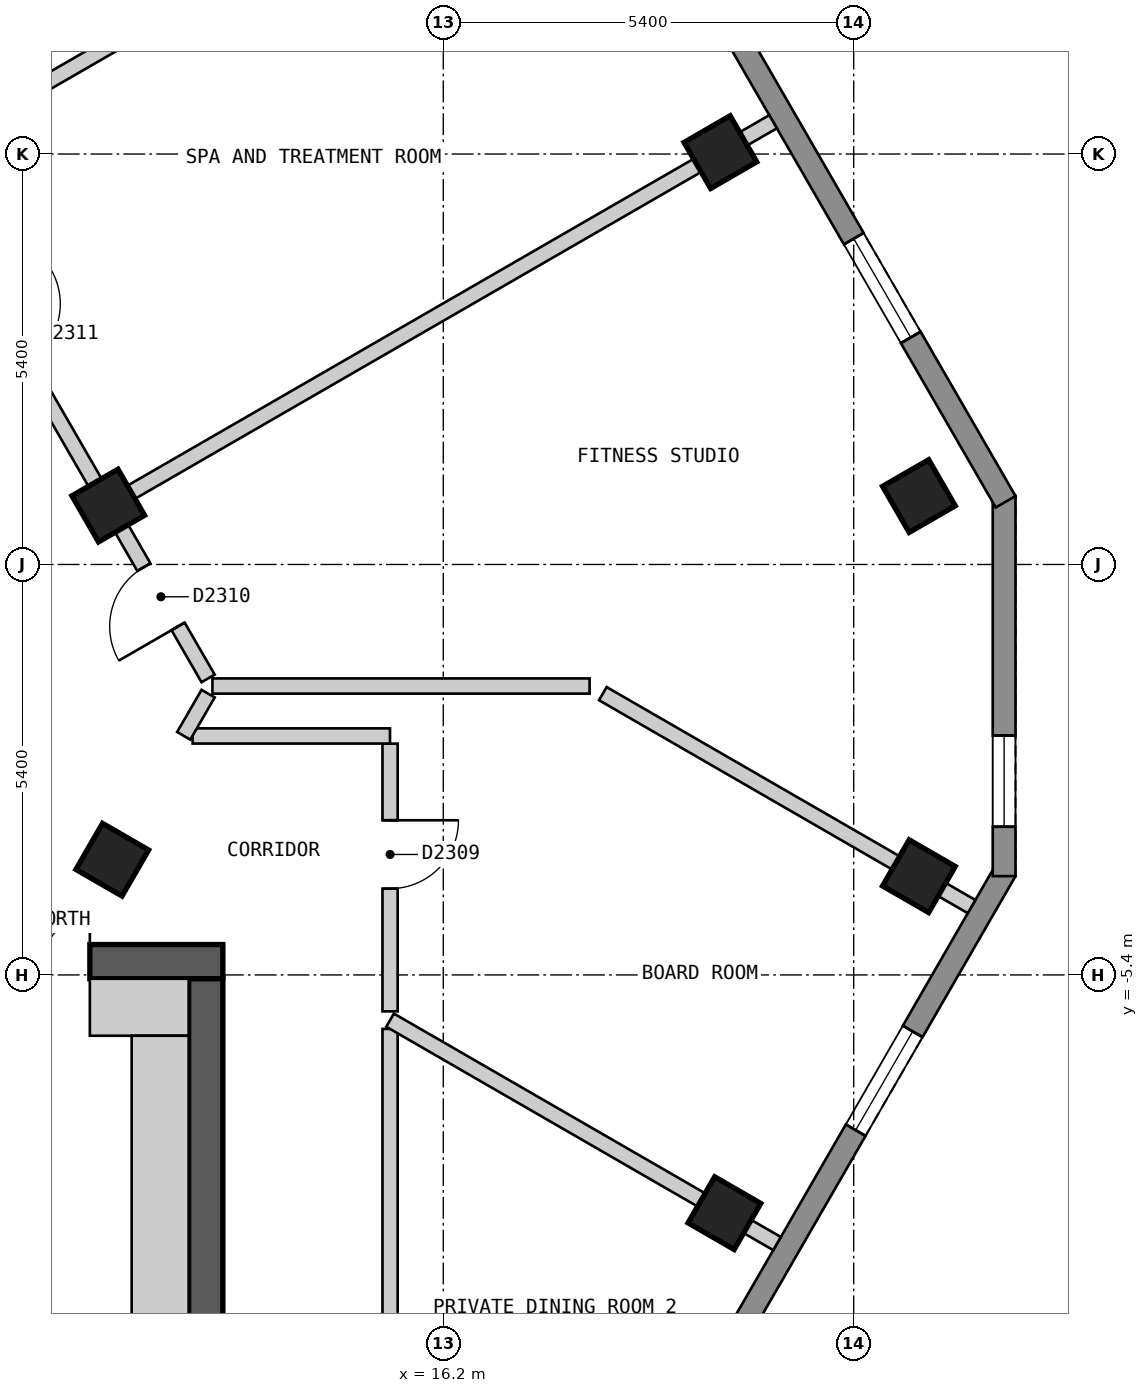
"""IFC4 building model, lengths in metres.
Left out: names, types, materials, properties, quantities, classifications, styles, units other than length and angle.
Written with IfcOpenShell. Run it as: python <this file> out.ifc"""

import sys

from ifc_helpers import new_model, si_unit, direction, frame, frame_2d, origin, origin_2d, place, context, subcontext, project, spatial, polyline, rectangle, outline, extrude, element, fill, save


model = new_model("IFC4")
c1 = context("Model", 3, precision=1e-05, world=origin(), true_north=direction((0.0, 1.0)))
c2 = subcontext(c1, "Body", "Model", "MODEL_VIEW")
j1 = project(units=[si_unit("LENGTHUNIT", "METRE"), si_unit("PLANEANGLEUNIT", "RADIAN")], contexts=[c1])
p1 = place(None, origin())
s1 = spatial("IfcSite", under=j1, at=p1, CompositionType="ELEMENT")
p2 = place(p1, origin())
s2 = spatial("IfcBuilding", under=s1, at=p2, CompositionType="ELEMENT")
p3 = place(p2, frame((0.0, 0.0, 241.8)))
s3 = spatial("IfcBuildingStorey", under=s2, at=p3, CompositionType="ELEMENT", Elevation=241.8)
for number, where, z_axis, x_axis in (
    (1, (19.899, -8.534, 0.0), (0.0, 0.0, 1.0), (0.5, 0.866, 0.0)),
    (2, (22.458, -4.101, 0.0), (0.0, 0.0, 1.0), (0.5, 0.866, 0.0)),
    (3, (22.458, 0.9, 0.0), (0.0, 0.0, 1.0), (-0.5, 0.866, 0.0)),
    (4, (19.846, 5.425, 0.0), (0.0, 0.0, 1.0), (-0.5, 0.866, 0.0)),
    (5, (11.845, -3.884, 0.0), (0.0, 0.0, 1.0), (0.5, 0.866, 0.0)),
    (6, (11.792, 0.775, 0.0), (0.0, 0.0, 1.0), (-0.5, 0.866, 0.0)),
):
    element("IfcColumn", number, at=place(p3, frame(where, z_axis=z_axis, x_axis=x_axis)), inside=s3, PredefinedType="COLUMN", context=c2, shape_type="SweptSolid", body=[
        extrude(rectangle(XDim=0.7, YDim=0.7, at=origin_2d()), origin(), (0.0, 0.0, 1.0), 3.0),
    ])
p4 = place(p3, frame((-13.3, -5.225, 0.0), z_axis=(0.0, 0.0, 1.0), x_axis=(1.0, 0.0, 0.0)))
e7 = element("IfcWall", 7, at=p4, inside=s3, PredefinedType="SHEAR", context=c2, shape_type="SweptSolid", body=[
    extrude(rectangle(XDim=26.6, YDim=0.45, at=frame_2d((13.3, 0.0))), origin(), (0.0, 0.0, 1.0), 2.2),
])
p5 = place(p4, frame((23.65, 0.0, 0.0)))
e8 = element("IfcOpeningElement", 8, at=p5, cuts=e7, PredefinedType="OPENING", context=c2, shape_type="SweptSolid", body=[
    extrude(rectangle(XDim=1.2, YDim=2.1, at=frame_2d((0.6, 1.05))), frame((0.0, 0.235, 0.0), z_axis=(0.0, -1.0, 0.0), x_axis=(1.0, 0.0, 0.0)), (0.0, 0.0, 1.0), 0.47),
])
p6 = place(p3, frame((13.075, -18.55, 0.0), z_axis=(0.0, 0.0, 1.0), x_axis=(0.0, 1.0, 0.0)))
e9 = element("IfcWall", 9, at=p6, inside=s3, PredefinedType="SHEAR", context=c2, shape_type="SweptSolid", body=[
    extrude(rectangle(XDim=13.1, YDim=0.45, at=frame_2d((6.55, 0.0))), origin(), (0.0, 0.0, 1.0), 2.2),
])
p7 = place(p3, frame((15.285, -18.425, 0.0), z_axis=(0.0, 0.0, 1.0), x_axis=(0.500012653391, 0.866018098222, 0.0)))
e10 = element("IfcWall", 10, at=p7, inside=s3, PredefinedType="SOLIDWALL", context=c2, shape_type="SweptSolid", body=[
    extrude(outline(polyline([(0.0, -0.15), (16.628, -0.15), (16.548, 0.15), (0.08, 0.15), (0.0, -0.15)])), origin(), (0.0, 0.0, 1.0), 2.2),
])
p8 = place(p7, frame((2.444, 0.0, 0.15)))
e11 = element("IfcOpeningElement", 11, at=p8, cuts=e10, PredefinedType="OPENING", context=c2, shape_type="SweptSolid", body=[
    extrude(rectangle(XDim=1.5, YDim=2.1, at=frame_2d((0.75, 1.05))), frame((0.0, 0.16, 0.0), z_axis=(0.0, -1.0, 0.0), x_axis=(1.0, 0.0, 0.0)), (0.0, 0.0, 1.0), 0.32),
])
p9 = place(p7, frame((7.564, 0.0, 0.15)))
e12 = element("IfcOpeningElement", 12, at=p9, cuts=e10, PredefinedType="OPENING", context=c2, shape_type="SweptSolid", body=[
    extrude(rectangle(XDim=1.5, YDim=2.1, at=frame_2d((0.75, 1.05))), frame((0.0, 0.16, 0.0), z_axis=(0.0, -1.0, 0.0), x_axis=(1.0, 0.0, 0.0)), (0.0, 0.0, 1.0), 0.32),
])
p10 = place(p7, frame((12.682, 0.0, 0.15)))
e13 = element("IfcOpeningElement", 13, at=p10, cuts=e10, PredefinedType="OPENING", context=c2, shape_type="SweptSolid", body=[
    extrude(rectangle(XDim=1.5, YDim=2.1, at=frame_2d((0.75, 1.05))), frame((0.0, 0.16, 0.0), z_axis=(0.0, -1.0, 0.0), x_axis=(1.0, 0.0, 0.0)), (0.0, 0.0, 1.0), 0.32),
])
p11 = place(p3, frame((23.579, -4.1, 0.0), z_axis=(0.0, 0.0, 1.0), x_axis=(0.0, 1.0, 0.0)))
e14 = element("IfcWall", 14, at=p11, inside=s3, PredefinedType="SOLIDWALL", context=c2, shape_type="SweptSolid", body=[
    extrude(outline(polyline([(0.0, -0.15), (5.0, -0.15), (4.92, 0.15), (0.08, 0.15), (0.0, -0.15)])), origin(), (0.0, 0.0, 1.0), 2.2),
])
p12 = place(p11, frame((0.65, 0.0, 0.15)))
e15 = element("IfcOpeningElement", 15, at=p12, cuts=e14, PredefinedType="OPENING", context=c2, shape_type="SweptSolid", body=[
    extrude(rectangle(XDim=1.2, YDim=2.1, at=frame_2d((0.6, 1.05))), frame((0.0, 0.16, 0.0), z_axis=(0.0, -1.0, 0.0), x_axis=(1.0, 0.0, 0.0)), (0.0, 0.0, 1.0), 0.32),
])
p13 = place(p3, frame((23.599, 0.825, 0.0), z_axis=(0.0, 0.0, 1.0), x_axis=(-0.500003656944, 0.866023292436, 0.0)))
e16 = element("IfcWall", 16, at=p13, inside=s3, PredefinedType="SOLIDWALL", context=c2, shape_type="SweptSolid", body=[
    extrude(outline(polyline([(0.0, -0.15), (22.17, -0.15), (22.09, 0.15), (0.08, 0.15), (0.0, -0.15)])), origin(), (0.0, 0.0, 1.0), 2.2),
])
p14 = place(p13, frame((2.497, 0.0, 0.15)))
e17 = element("IfcOpeningElement", 17, at=p14, cuts=e16, PredefinedType="OPENING", context=c2, shape_type="SweptSolid", body=[
    extrude(rectangle(XDim=1.5, YDim=2.1, at=frame_2d((0.75, 1.05))), frame((0.0, 0.16, 0.0), z_axis=(0.0, -1.0, 0.0), x_axis=(1.0, 0.0, 0.0)), (0.0, 0.0, 1.0), 0.32),
])
p15 = place(p13, frame((7.723, 0.0, 0.15)))
e18 = element("IfcOpeningElement", 18, at=p15, cuts=e16, PredefinedType="OPENING", context=c2, shape_type="SweptSolid", body=[
    extrude(rectangle(XDim=1.5, YDim=2.1, at=frame_2d((0.75, 1.05))), frame((0.0, 0.16, 0.0), z_axis=(0.0, -1.0, 0.0), x_axis=(1.0, 0.0, 0.0)), (0.0, 0.0, 1.0), 0.32),
])
p16 = place(p13, frame((12.948, 0.0, 0.15)))
e19 = element("IfcOpeningElement", 19, at=p16, cuts=e16, PredefinedType="OPENING", context=c2, shape_type="SweptSolid", body=[
    extrude(rectangle(XDim=1.5, YDim=2.1, at=frame_2d((0.75, 1.05))), frame((0.0, 0.16, 0.0), z_axis=(0.0, -1.0, 0.0), x_axis=(1.0, 0.0, 0.0)), (0.0, 0.0, 1.0), 0.32),
])
p17 = place(p13, frame((18.173, 0.0, 0.15)))
e20 = element("IfcOpeningElement", 20, at=p17, cuts=e16, PredefinedType="OPENING", context=c2, shape_type="SweptSolid", body=[
    extrude(rectangle(XDim=1.5, YDim=2.1, at=frame_2d((0.75, 1.05))), frame((0.0, 0.16, 0.0), z_axis=(0.0, -1.0, 0.0), x_axis=(1.0, 0.0, 0.0)), (0.0, 0.0, 1.0), 0.32),
])
p18 = place(p3, frame((9.238, 5.2, 0.0), z_axis=(0.0, 0.0, 1.0), x_axis=(0.500025705601, -0.86601056214, 0.0)))
e21 = element("IfcWall", 21, at=p18, inside=s3, PredefinedType="PARTITIONING", context=c2, shape_type="SweptSolid", body=[
    extrude(rectangle(XDim=7.735, YDim=0.2, at=frame_2d((3.868, 0.0))), origin(), (0.0, 0.0, 1.0), 2.2),
])
p19 = place(p18, frame((6.045, 0.0, 0.0)))
e22 = element("IfcOpeningElement", 22, at=p19, cuts=e21, PredefinedType="OPENING", context=c2, shape_type="SweptSolid", body=[
    extrude(rectangle(XDim=0.9, YDim=2.1, at=frame_2d((0.45, 1.05))), frame((0.0, 0.11, 0.0), z_axis=(0.0, -1.0, 0.0), x_axis=(1.0, 0.0, 0.0)), (0.0, 0.0, 1.0), 0.22),
])
p20 = place(p18, frame((2.046, 0.0, 0.0)))
e23 = element("IfcOpeningElement", 23, at=p20, cuts=e21, PredefinedType="OPENING", context=c2, shape_type="SweptSolid", body=[
    extrude(rectangle(XDim=0.9, YDim=2.1, at=frame_2d((0.45, 1.05))), frame((0.0, 0.11, 0.0), z_axis=(0.0, -1.0, 0.0), x_axis=(1.0, 0.0, 0.0)), (0.0, 0.0, 1.0), 0.22),
])
p21 = place(p3, frame((15.5, -2.357, 0.0), z_axis=(0.0, 0.0, 1.0), x_axis=(0.0, -1.0, 0.0)))
e24 = element("IfcWall", 24, at=p21, inside=s3, PredefinedType="PARTITIONING", context=c2, shape_type="SweptSolid", body=[
    extrude(rectangle(XDim=3.522, YDim=0.2, at=frame_2d((1.761, 0.0))), origin(), (0.0, 0.0, 1.0), 2.2),
])
p22 = place(p21, frame((1.008, 0.0, 0.0)))
e25 = element("IfcOpeningElement", 25, at=p22, cuts=e24, PredefinedType="OPENING", context=c2, shape_type="SweptSolid", body=[
    extrude(rectangle(XDim=0.9, YDim=2.1, at=frame_2d((0.45, 1.05))), frame((0.0, 0.11, 0.0), z_axis=(0.0, -1.0, 0.0), x_axis=(1.0, 0.0, 0.0)), (0.0, 0.0, 1.0), 0.22),
])
p23 = place(p3, frame((12.902, -2.256, 0.0), z_axis=(0.0, 0.0, 1.0), x_axis=(1.0, 0.0, 0.0)))
e26 = element("IfcWall", 26, at=p23, inside=s3, PredefinedType="PARTITIONING", context=c2, shape_type="SweptSolid", body=[
    extrude(rectangle(XDim=2.597, YDim=0.2, at=frame_2d((1.298, 0.0))), origin(), (0.0, 0.0, 1.0), 2.2),
])
p24 = place(p3, frame((12.785, -2.254, 0.0), z_axis=(0.0, 0.0, 1.0), x_axis=(0.500766044352, 0.865582675903, 0.0)))
e27 = element("IfcWall", 27, at=p24, inside=s3, PredefinedType="PARTITIONING", context=c2, shape_type="SweptSolid", body=[
    extrude(rectangle(XDim=0.641, YDim=0.2, at=frame_2d((0.321, 0.0))), origin(), (0.0, 0.0, 1.0), 2.2),
])
p25 = place(p3, frame((15.5, -17.752, 0.0), z_axis=(0.0, 0.0, 1.0), x_axis=(0.0, 1.0, 0.0)))
e28 = element("IfcWall", 28, at=p25, inside=s3, PredefinedType="PARTITIONING", context=c2, shape_type="SweptSolid", body=[
    extrude(rectangle(XDim=11.642, YDim=0.2, at=frame_2d((5.821, 0.0))), origin(), (0.0, 0.0, 1.0), 2.2),
])
p26 = place(p25, frame((5.411, 0.0, 0.0)))
e29 = element("IfcOpeningElement", 29, at=p26, cuts=e28, PredefinedType="OPENING", context=c2, shape_type="SweptSolid", body=[
    extrude(rectangle(XDim=0.9, YDim=2.1, at=frame_2d((0.45, 1.05))), frame((0.0, 0.11, 0.0), z_axis=(0.0, -1.0, 0.0), x_axis=(1.0, 0.0, 0.0)), (0.0, 0.0, 1.0), 0.22),
])
p27 = place(p3, frame((18.299, -1.699, 0.0), z_axis=(0.0, 0.0, 1.0), x_axis=(0.865962789554, -0.50010843535, 0.0)))
e30 = element("IfcWall", 30, at=p27, inside=s3, PredefinedType="PARTITIONING", context=c2, shape_type="SweptSolid", body=[
    extrude(rectangle(XDim=5.603, YDim=0.2, at=frame_2d((2.801, 0.0))), origin(), (0.0, 0.0, 1.0), 2.2),
])
p28 = place(p3, frame((15.5, -5.995, 0.0), z_axis=(0.0, 0.0, 1.0), x_axis=(0.866052111102, -0.499953738716, 0.0)))
e31 = element("IfcWall", 31, at=p28, inside=s3, PredefinedType="PARTITIONING", context=c2, shape_type="SweptSolid", body=[
    extrude(rectangle(XDim=5.878, YDim=0.2, at=frame_2d((2.939, 0.0))), origin(), (0.0, 0.0, 1.0), 2.2),
])
p29 = place(p3, frame((13.163, -1.599, 0.0), z_axis=(0.0, 0.0, 1.0), x_axis=(1.0, 0.0, 0.0)))
e32 = element("IfcWall", 32, at=p29, inside=s3, PredefinedType="PARTITIONING", context=c2, shape_type="SweptSolid", body=[
    extrude(rectangle(XDim=4.962, YDim=0.2, at=frame_2d((2.481, 0.0))), origin(), (0.0, 0.0, 1.0), 2.2),
])
p30 = place(p3, frame((11.879, 0.826, 0.0), z_axis=(0.0, 0.0, 1.0), x_axis=(0.866065245018, 0.499930986609, 0.0)))
e33 = element("IfcWall", 33, at=p30, inside=s3, PredefinedType="PARTITIONING", context=c2, shape_type="SweptSolid", body=[
    extrude(rectangle(XDim=10.0, YDim=0.2, at=frame_2d((5.0, 0.0))), origin(), (0.0, 0.0, 1.0), 2.2),
])
p31 = place(p3, frame((9.354, 5.401, 0.0), z_axis=(0.0, 0.0, 1.0), x_axis=(0.866018411306, 0.500012111133, 0.0)))
e34 = element("IfcWall", 34, at=p31, inside=s3, PredefinedType="PARTITIONING", context=c2, shape_type="SweptSolid", body=[
    extrude(rectangle(XDim=9.898, YDim=0.2, at=frame_2d((4.949, 0.0))), origin(), (0.0, 0.0, 1.0), 2.2),
])
p32 = place(p3, frame((11.55, -5.825, 0.0), z_axis=(0.0, 0.0, 1.0), x_axis=(1.0, 0.0, 0.0)))
e35 = element("IfcWall", 35, at=p32, inside=s3, PredefinedType="PARTITIONING", context=c2, shape_type="SweptSolid", body=[
    extrude(rectangle(XDim=1.3, YDim=0.75, at=frame_2d((0.65, 0.0))), origin(), (0.0, 0.0, 1.0), 2.2),
])
p33 = place(p3, frame((12.475, -14.45, 0.0), z_axis=(0.0, 0.0, 1.0), x_axis=(0.0, 1.0, 0.0)))
e36 = element("IfcWall", 36, at=p33, inside=s3, PredefinedType="PARTITIONING", context=c2, shape_type="SweptSolid", body=[
    extrude(rectangle(XDim=8.25, YDim=0.75, at=frame_2d((4.125, 0.0))), origin(), (0.0, 0.0, 1.0), 2.2),
])
p34 = place(p10, origin())
e37 = element("IfcWindow", 37, at=p34, inside=s3, PartitioningType="SINGLE_PANEL", PredefinedType="WINDOW", context=c2, shape_type="SweptSolid", body=[
    extrude(rectangle(XDim=1.5, YDim=2.1, at=frame_2d((0.75, 1.05))), frame((0.0, 0.03, 0.0), z_axis=(0.0, -1.0, 0.0), x_axis=(1.0, 0.0, 0.0)), (0.0, 0.0, 1.0), 0.06),
])
fill(e13, e37)
p35 = place(p12, origin())
e38 = element("IfcWindow", 38, at=p35, inside=s3, PartitioningType="SINGLE_PANEL", PredefinedType="WINDOW", context=c2, shape_type="SweptSolid", body=[
    extrude(rectangle(XDim=1.2, YDim=2.1, at=frame_2d((0.6, 1.05))), frame((0.0, 0.03, 0.0), z_axis=(0.0, -1.0, 0.0), x_axis=(1.0, 0.0, 0.0)), (0.0, 0.0, 1.0), 0.06),
])
fill(e15, e38)
p36 = place(p14, origin())
e39 = element("IfcWindow", 39, at=p36, inside=s3, PartitioningType="SINGLE_PANEL", PredefinedType="WINDOW", context=c2, shape_type="SweptSolid", body=[
    extrude(rectangle(XDim=1.5, YDim=2.1, at=frame_2d((0.75, 1.05))), frame((0.0, 0.03, 0.0), z_axis=(0.0, -1.0, 0.0), x_axis=(1.0, 0.0, 0.0)), (0.0, 0.0, 1.0), 0.06),
])
fill(e17, e39)
p37 = place(p22, origin())
e40 = element("IfcDoor", 40, at=p37, inside=s3, OperationType="SINGLE_SWING_LEFT", PredefinedType="DOOR", context=c2, shape_type="SweptSolid", body=[
    extrude(rectangle(XDim=0.9, YDim=2.1, at=frame_2d((0.45, 1.05))), frame((0.0, 0.025, 0.0), z_axis=(0.0, -1.0, 0.0), x_axis=(1.0, 0.0, 0.0)), (0.0, 0.0, 1.0), 0.05),
])
fill(e25, e40)
p38 = place(p19, origin())
e41 = element("IfcDoor", 41, at=p38, inside=s3, OperationType="SINGLE_SWING_RIGHT", PredefinedType="DOOR", context=c2, shape_type="SweptSolid", body=[
    extrude(rectangle(XDim=0.9, YDim=2.1, at=frame_2d((0.45, 1.05))), frame((0.0, 0.025, 0.0), z_axis=(0.0, -1.0, 0.0), x_axis=(1.0, 0.0, 0.0)), (0.0, 0.0, 1.0), 0.05),
])
fill(e22, e41)
p39 = place(p5, origin())
e42 = element("IfcDoor", 42, at=p39, inside=s3, OperationType="DOUBLE_DOOR_SINGLE_SWING", PredefinedType="DOOR", context=c2, shape_type="SweptSolid", body=[
    extrude(rectangle(XDim=1.2, YDim=2.1, at=frame_2d((0.6, 1.05))), frame((0.0, 0.025, 0.0), z_axis=(0.0, -1.0, 0.0), x_axis=(1.0, 0.0, 0.0)), (0.0, 0.0, 1.0), 0.05),
])
fill(e8, e42)
save(model, sys.argv[1])
